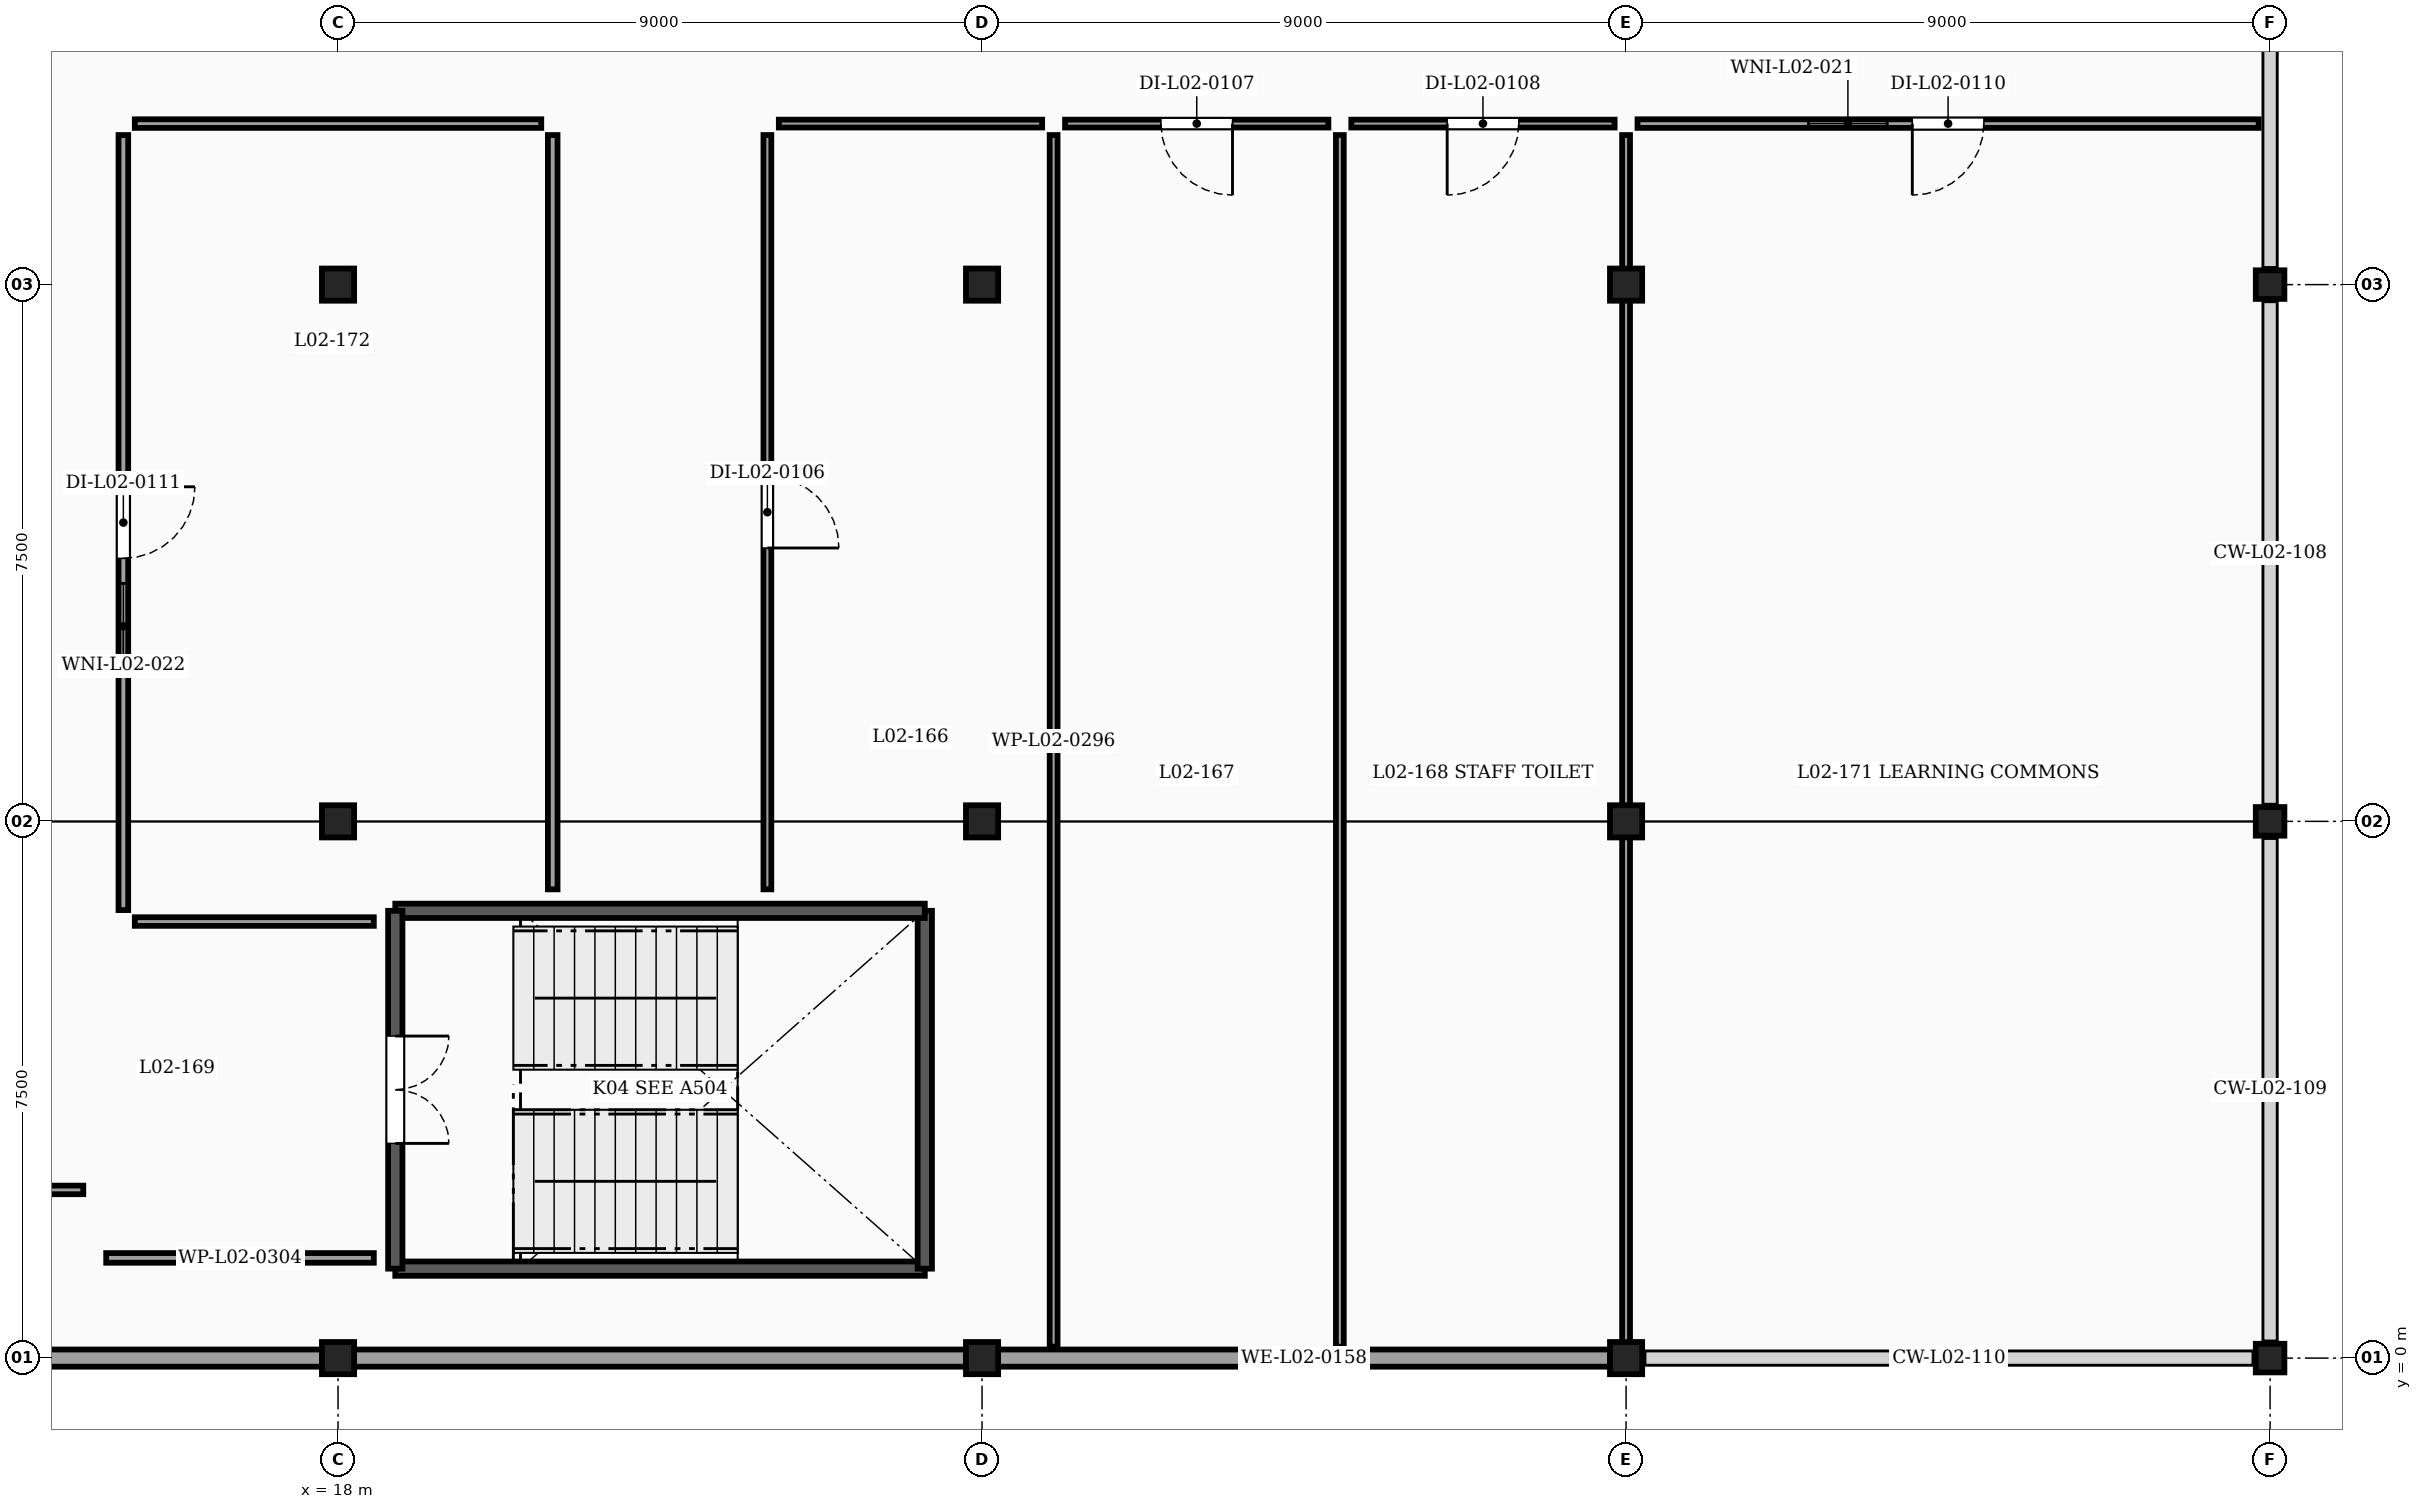
"""IFC4 building model, lengths in metres.
Left out: names, types, materials, properties, quantities, classifications, styles, units other than length and angle.
Written with IfcOpenShell. Run it as: python <this file> out.ifc"""

import sys

from ifc_helpers import new_model, si_unit, direction, frame, frame_2d, origin, origin_2d, place, context, subcontext, project, spatial, rectangle, extrude, element, fill, save


model = new_model("IFC4")
c1 = context("Model", 3, precision=1e-05, world=origin(), true_north=direction((0.0, 1.0)))
c2 = subcontext(c1, "Body", "Model", "MODEL_VIEW")
j1 = project(units=[si_unit("LENGTHUNIT", "METRE"), si_unit("PLANEANGLEUNIT", "RADIAN")], contexts=[c1])
p1 = place(None, origin())
s1 = spatial("IfcSite", under=j1, at=p1, CompositionType="ELEMENT")
p2 = place(p1, origin())
s2 = spatial("IfcBuilding", under=s1, at=p2, CompositionType="ELEMENT")
p3 = place(p2, frame((0.0, 0.0, 8.5)))
s3 = spatial("IfcBuildingStorey", under=s2, at=p3, CompositionType="ELEMENT", Elevation=8.5)
for number, where, z_axis, x_axis in (
    (1, (18.0, 0.0, 0.0), (0.0, 0.0, 1.0), (1.0, 0.0, 0.0)),
    (2, (27.0, 0.0, 0.0), (0.0, 0.0, 1.0), (1.0, 0.0, 0.0)),
    (3, (36.0, 0.0, 0.0), (0.0, 0.0, 1.0), (1.0, 0.0, 0.0)),
):
    element("IfcColumn", number, at=place(p3, frame(where, z_axis=z_axis, x_axis=x_axis)), inside=s3, PredefinedType="COLUMN", context=c2, shape_type="SweptSolid", body=[
        extrude(rectangle(XDim=0.45, YDim=0.45, at=origin_2d()), origin(), (0.0, 0.0, 1.0), 3.8),
    ])
p4 = place(p3, frame((45.0, 0.0, 0.0), z_axis=(0.0, 0.0, 1.0), x_axis=(1.0, 0.0, 0.0)))
e4 = element("IfcColumn", 4, at=p4, inside=s3, PredefinedType="COLUMN", context=c2, shape_type="SweptSolid", body=[
    extrude(rectangle(XDim=0.4, YDim=0.4, at=origin_2d()), origin(), (0.0, 0.0, 1.0), 3.8),
])
for number, where, z_axis, x_axis in (
    (5, (18.0, 7.5, 0.0), (0.0, 0.0, 1.0), (1.0, 0.0, 0.0)),
    (6, (27.0, 7.5, 0.0), (0.0, 0.0, 1.0), (1.0, 0.0, 0.0)),
    (7, (36.0, 7.5, 0.0), (0.0, 0.0, 1.0), (1.0, 0.0, 0.0)),
):
    element("IfcColumn", number, at=place(p3, frame(where, z_axis=z_axis, x_axis=x_axis)), inside=s3, PredefinedType="COLUMN", context=c2, shape_type="SweptSolid", body=[
        extrude(rectangle(XDim=0.45, YDim=0.45, at=origin_2d()), origin(), (0.0, 0.0, 1.0), 3.8),
    ])
p5 = place(p3, frame((45.0, 7.5, 0.0), z_axis=(0.0, 0.0, 1.0), x_axis=(1.0, 0.0, 0.0)))
e8 = element("IfcColumn", 8, at=p5, inside=s3, PredefinedType="COLUMN", context=c2, shape_type="SweptSolid", body=[
    extrude(rectangle(XDim=0.4, YDim=0.4, at=origin_2d()), origin(), (0.0, 0.0, 1.0), 3.8),
])
for number, where, z_axis, x_axis in (
    (9, (18.0, 15.0, 0.0), (0.0, 0.0, 1.0), (1.0, 0.0, 0.0)),
    (10, (27.0, 15.0, 0.0), (0.0, 0.0, 1.0), (1.0, 0.0, 0.0)),
    (11, (36.0, 15.0, 0.0), (0.0, 0.0, 1.0), (1.0, 0.0, 0.0)),
):
    element("IfcColumn", number, at=place(p3, frame(where, z_axis=z_axis, x_axis=x_axis)), inside=s3, PredefinedType="COLUMN", context=c2, shape_type="SweptSolid", body=[
        extrude(rectangle(XDim=0.45, YDim=0.45, at=origin_2d()), origin(), (0.0, 0.0, 1.0), 3.8),
    ])
p6 = place(p3, frame((45.0, 15.0, 0.0), z_axis=(0.0, 0.0, 1.0), x_axis=(1.0, 0.0, 0.0)))
e12 = element("IfcColumn", 12, at=p6, inside=s3, PredefinedType="COLUMN", context=c2, shape_type="SweptSolid", body=[
    extrude(rectangle(XDim=0.4, YDim=0.4, at=origin_2d()), origin(), (0.0, 0.0, 1.0), 3.8),
])
for number, where, z_axis, x_axis in (
    (13, (35.779, 0.0, 0.0), (0.0, 0.0, 1.0), (-1.0, 0.0, 0.0)),
    (14, (26.779, 0.0, 0.0), (0.0, 0.0, 1.0), (-1.0, 0.0, 0.0)),
    (15, (17.779, 0.0, 0.0), (0.0, 0.0, 1.0), (-1.0, 0.0, 0.0)),
):
    element("IfcWall", number, at=place(p3, frame(where, z_axis=z_axis, x_axis=x_axis)), inside=s3, PredefinedType="SOLIDWALL", context=c2, shape_type="SweptSolid", body=[
        extrude(rectangle(XDim=8.558, YDim=0.24, at=frame_2d((4.279, 0.0))), origin(), (0.0, 0.0, 1.0), 3.23),
    ])
p7 = place(p3, frame((18.8, 1.25, 0.0), z_axis=(0.0, 0.0, 1.0), x_axis=(1.0, 0.0, 0.0)))
e16 = element("IfcWall", 16, at=p7, inside=s3, PredefinedType="SHEAR", context=c2, shape_type="SweptSolid", body=[
    extrude(rectangle(XDim=7.4, YDim=0.2, at=frame_2d((3.7, 0.0))), origin(), (0.0, 0.0, 1.0), 3.59),
])
p8 = place(p3, frame((26.2, 1.25, 0.0), z_axis=(0.0, 0.0, 1.0), x_axis=(0.0, 1.0, 0.0)))
e17 = element("IfcWall", 17, at=p8, inside=s3, PredefinedType="SHEAR", context=c2, shape_type="SweptSolid", body=[
    extrude(rectangle(XDim=5.0, YDim=0.2, at=frame_2d((2.5, 0.0))), origin(), (0.0, 0.0, 1.0), 3.59),
])
p9 = place(p3, frame((26.2, 6.25, 0.0), z_axis=(0.0, 0.0, 1.0), x_axis=(-1.0, 0.0, 0.0)))
e18 = element("IfcWall", 18, at=p9, inside=s3, PredefinedType="SHEAR", context=c2, shape_type="SweptSolid", body=[
    extrude(rectangle(XDim=7.4, YDim=0.2, at=frame_2d((3.7, 0.0))), origin(), (0.0, 0.0, 1.0), 3.59),
])
p10 = place(p3, frame((18.8, 6.25, 0.0), z_axis=(0.0, 0.0, 1.0), x_axis=(0.0, -1.0, 0.0)))
e19 = element("IfcWall", 19, at=p10, inside=s3, PredefinedType="SHEAR", context=c2, shape_type="SweptSolid", body=[
    extrude(rectangle(XDim=5.0, YDim=0.2, at=frame_2d((2.5, 0.0))), origin(), (0.0, 0.0, 1.0), 3.59),
])
p11 = place(p10, frame((1.75, 0.0, 0.0)))
e20 = element("IfcOpeningElement", 20, at=p11, cuts=e19, PredefinedType="OPENING", context=c2, shape_type="SweptSolid", body=[
    extrude(rectangle(XDim=1.5, YDim=2.15, at=frame_2d((0.75, 1.075))), frame((0.0, 0.11, 0.0), z_axis=(0.0, -1.0, 0.0), x_axis=(1.0, 0.0, 0.0)), (0.0, 0.0, 1.0), 0.22),
])
p12 = place(p3, frame((28.0, 0.16, 0.0), z_axis=(0.0, 0.0, 1.0), x_axis=(0.0, 1.0, 0.0)))
e21 = element("IfcWall", 21, at=p12, inside=s3, PredefinedType="PARTITIONING", context=c2, shape_type="SweptSolid", body=[
    extrude(rectangle(XDim=16.93, YDim=0.11, at=frame_2d((8.465, 0.0))), origin(), (0.0, 0.0, 1.0), 3.59),
])
p13 = place(p3, frame((24.0, 17.09, 0.0), z_axis=(0.0, 0.0, 1.0), x_axis=(0.0, -1.0, 0.0)))
e22 = element("IfcWall", 22, at=p13, inside=s3, PredefinedType="PARTITIONING", context=c2, shape_type="SweptSolid", body=[
    extrude(rectangle(XDim=10.54, YDim=0.11, at=frame_2d((5.27, 0.0))), origin(), (0.0, 0.0, 1.0), 3.182),
])
p14 = place(p13, frame((4.77, 0.0, 0.0)))
e23 = element("IfcOpeningElement", 23, at=p14, cuts=e22, PredefinedType="OPENING", context=c2, shape_type="SweptSolid", body=[
    extrude(rectangle(XDim=1.0, YDim=2.15, at=frame_2d((0.5, 1.075))), frame((0.0, 0.065, 0.0), z_axis=(0.0, -1.0, 0.0), x_axis=(1.0, 0.0, 0.0)), (0.0, 0.0, 1.0), 0.13),
])
p15 = place(p3, frame((27.84, 17.25, 0.0), z_axis=(0.0, 0.0, 1.0), x_axis=(-1.0, 0.0, 0.0)))
e24 = element("IfcWall", 24, at=p15, inside=s3, PredefinedType="PARTITIONING", context=c2, shape_type="SweptSolid", body=[
    extrude(rectangle(XDim=3.68, YDim=0.11, at=frame_2d((1.84, 0.0))), origin(), (0.0, 0.0, 1.0), 3.59),
])
p16 = place(p3, frame((32.0, 0.16, 0.0), z_axis=(0.0, 0.0, 1.0), x_axis=(0.0, 1.0, 0.0)))
e25 = element("IfcWall", 25, at=p16, inside=s3, PredefinedType="PARTITIONING", context=c2, shape_type="SweptSolid", body=[
    extrude(rectangle(XDim=16.93, YDim=0.11, at=frame_2d((8.465, 0.0))), origin(), (0.0, 0.0, 1.0), 3.59),
])
p17 = place(p3, frame((31.84, 17.25, 0.0), z_axis=(0.0, 0.0, 1.0), x_axis=(-1.0, 0.0, 0.0)))
e26 = element("IfcWall", 26, at=p17, inside=s3, PredefinedType="PARTITIONING", context=c2, shape_type="SweptSolid", body=[
    extrude(rectangle(XDim=3.68, YDim=0.11, at=frame_2d((1.84, 0.0))), origin(), (0.0, 0.0, 1.0), 3.59),
])
p18 = place(p17, frame((1.34, 0.0, 0.0)))
e27 = element("IfcOpeningElement", 27, at=p18, cuts=e26, PredefinedType="OPENING", context=c2, shape_type="SweptSolid", body=[
    extrude(rectangle(XDim=1.0, YDim=2.15, at=frame_2d((0.5, 1.075))), frame((0.0, 0.065, 0.0), z_axis=(0.0, -1.0, 0.0), x_axis=(1.0, 0.0, 0.0)), (0.0, 0.0, 1.0), 0.13),
])
p19 = place(p3, frame((35.84, 17.25, 0.0), z_axis=(0.0, 0.0, 1.0), x_axis=(-1.0, 0.0, 0.0)))
e28 = element("IfcWall", 28, at=p19, inside=s3, PredefinedType="PARTITIONING", context=c2, shape_type="SweptSolid", body=[
    extrude(rectangle(XDim=3.68, YDim=0.11, at=frame_2d((1.84, 0.0))), origin(), (0.0, 0.0, 1.0), 3.59),
])
p20 = place(p19, frame((1.34, 0.0, 0.0)))
e29 = element("IfcOpeningElement", 29, at=p20, cuts=e28, PredefinedType="OPENING", context=c2, shape_type="SweptSolid", body=[
    extrude(rectangle(XDim=1.0, YDim=2.15, at=frame_2d((0.5, 1.075))), frame((0.0, 0.065, 0.0), z_axis=(0.0, -1.0, 0.0), x_axis=(1.0, 0.0, 0.0)), (0.0, 0.0, 1.0), 0.13),
])
p21 = place(p3, frame((36.0, 0.16, 0.0), z_axis=(0.0, 0.0, 1.0), x_axis=(0.0, 1.0, 0.0)))
e30 = element("IfcWall", 30, at=p21, inside=s3, PredefinedType="PARTITIONING", context=c2, shape_type="SweptSolid", body=[
    extrude(rectangle(XDim=16.93, YDim=0.11, at=frame_2d((8.465, 0.0))), origin(), (0.0, 0.0, 1.0), 3.049),
])
p22 = place(p3, frame((18.5, 1.4, 0.0), z_axis=(0.0, 0.0, 1.0), x_axis=(-1.0, 0.0, 0.0)))
e31 = element("IfcWall", 31, at=p22, inside=s3, PredefinedType="PARTITIONING", context=c2, shape_type="SweptSolid", body=[
    extrude(rectangle(XDim=3.74, YDim=0.135, at=frame_2d((1.87, 0.0))), origin(), (0.0, 0.0, 1.0), 3.59),
])
p23 = place(p3, frame((14.44, 2.35, 0.0), z_axis=(0.0, 0.0, 1.0), x_axis=(-1.0, 0.0, 0.0)))
e32 = element("IfcWall", 32, at=p23, inside=s3, PredefinedType="PARTITIONING", context=c2, shape_type="SweptSolid", body=[
    extrude(rectangle(XDim=2.18, YDim=0.12, at=frame_2d((1.09, 0.0))), origin(), (0.0, 0.0, 1.0), 3.59),
])
p24 = place(p3, frame((44.84, 17.25, 0.0), z_axis=(0.0, 0.0, 1.0), x_axis=(-1.0, 0.0, 0.0)))
e33 = element("IfcWall", 33, at=p24, inside=s3, PredefinedType="PARTITIONING", context=c2, shape_type="SweptSolid", body=[
    extrude(rectangle(XDim=8.68, YDim=0.12, at=frame_2d((4.34, 0.0))), origin(), (0.0, 0.0, 1.0), 3.59),
])
p25 = place(p24, frame((3.84, 0.0, 0.0)))
e34 = element("IfcOpeningElement", 34, at=p25, cuts=e33, PredefinedType="OPENING", context=c2, shape_type="SweptSolid", body=[
    extrude(rectangle(XDim=1.0, YDim=2.15, at=frame_2d((0.5, 1.075))), frame((0.0, 0.07, 0.0), z_axis=(0.0, -1.0, 0.0), x_axis=(1.0, 0.0, 0.0)), (0.0, 0.0, 1.0), 0.14),
])
p26 = place(p24, frame((5.19, 0.0, 1.02)))
e35 = element("IfcOpeningElement", 35, at=p26, cuts=e33, PredefinedType="OPENING", context=c2, shape_type="SweptSolid", body=[
    extrude(rectangle(XDim=1.1, YDim=1.12, at=frame_2d((0.55, 0.56))), frame((0.0, 0.07, 0.0), z_axis=(0.0, -1.0, 0.0), x_axis=(1.0, 0.0, 0.0)), (0.0, 0.0, 1.0), 0.14),
])
p27 = place(p3, frame((21.0, 6.55, 0.0), z_axis=(0.0, 0.0, 1.0), x_axis=(0.0, 1.0, 0.0)))
e36 = element("IfcWall", 36, at=p27, inside=s3, PredefinedType="PARTITIONING", context=c2, shape_type="SweptSolid", body=[
    extrude(rectangle(XDim=10.54, YDim=0.135, at=frame_2d((5.27, 0.0))), origin(), (0.0, 0.0, 1.0), 3.182),
])
p28 = place(p3, frame((20.84, 17.25, 0.0), z_axis=(0.0, 0.0, 1.0), x_axis=(-1.0, 0.0, 0.0)))
e37 = element("IfcWall", 37, at=p28, inside=s3, PredefinedType="PARTITIONING", context=c2, shape_type="SweptSolid", body=[
    extrude(rectangle(XDim=5.68, YDim=0.12, at=frame_2d((2.84, 0.0))), origin(), (0.0, 0.0, 1.0), 3.59),
])
p29 = place(p3, frame((15.0, 17.09, 0.0), z_axis=(0.0, 0.0, 1.0), x_axis=(0.0, -1.0, 0.0)))
e38 = element("IfcWall", 38, at=p29, inside=s3, PredefinedType="PARTITIONING", context=c2, shape_type="SweptSolid", body=[
    extrude(rectangle(XDim=10.83, YDim=0.135, at=frame_2d((5.415, 0.0))), origin(), (0.0, 0.0, 1.0), 3.182),
])
p30 = place(p29, frame((4.915, 0.0, 0.0)))
e39 = element("IfcOpeningElement", 39, at=p30, cuts=e38, PredefinedType="OPENING", context=c2, shape_type="SweptSolid", body=[
    extrude(rectangle(XDim=1.0, YDim=2.15, at=frame_2d((0.5, 1.075))), frame((0.0, 0.077, 0.0), z_axis=(0.0, -1.0, 0.0), x_axis=(1.0, 0.0, 0.0)), (0.0, 0.0, 1.0), 0.155),
])
p31 = place(p29, frame((6.265, 0.0, 1.02)))
e40 = element("IfcOpeningElement", 40, at=p31, cuts=e38, PredefinedType="OPENING", context=c2, shape_type="SweptSolid", body=[
    extrude(rectangle(XDim=1.2, YDim=1.15, at=frame_2d((0.6, 0.575))), frame((0.0, 0.077, 0.0), z_axis=(0.0, -1.0, 0.0), x_axis=(1.0, 0.0, 0.0)), (0.0, 0.0, 1.0), 0.155),
])
p32 = place(p3, frame((15.16, 6.1, 0.0), z_axis=(0.0, 0.0, 1.0), x_axis=(1.0, 0.0, 0.0)))
e41 = element("IfcWall", 41, at=p32, inside=s3, PredefinedType="PARTITIONING", context=c2, shape_type="SweptSolid", body=[
    extrude(rectangle(XDim=3.34, YDim=0.12, at=frame_2d((1.67, 0.0))), origin(), (0.0, 0.0, 1.0), 3.59),
])
p33 = place(p11, origin())
e42 = element("IfcDoor", 42, at=p33, inside=s3, OperationType="DOUBLE_DOOR_SINGLE_SWING", PredefinedType="DOOR", context=c2, shape_type="SweptSolid", body=[
    extrude(rectangle(XDim=1.5, YDim=2.15, at=frame_2d((0.75, 1.075))), frame((0.0, 0.025, 0.0), z_axis=(0.0, -1.0, 0.0), x_axis=(1.0, 0.0, 0.0)), (0.0, 0.0, 1.0), 0.05),
])
fill(e20, e42)
p34 = place(p14, origin())
e43 = element("IfcDoor", 43, at=p34, inside=s3, OperationType="SINGLE_SWING_RIGHT", PredefinedType="DOOR", context=c2, shape_type="SweptSolid", body=[
    extrude(rectangle(XDim=1.0, YDim=2.15, at=frame_2d((0.5, 1.075))), frame((0.0, 0.025, 0.0), z_axis=(0.0, -1.0, 0.0), x_axis=(1.0, 0.0, 0.0)), (0.0, 0.0, 1.0), 0.05),
])
fill(e23, e43)
p35 = place(p18, origin())
e44 = element("IfcDoor", 44, at=p35, inside=s3, OperationType="SINGLE_SWING_LEFT", PredefinedType="DOOR", context=c2, shape_type="SweptSolid", body=[
    extrude(rectangle(XDim=1.0, YDim=2.15, at=frame_2d((0.5, 1.075))), frame((0.0, 0.025, 0.0), z_axis=(0.0, -1.0, 0.0), x_axis=(1.0, 0.0, 0.0)), (0.0, 0.0, 1.0), 0.05),
])
fill(e27, e44)
p36 = place(p20, origin())
e45 = element("IfcDoor", 45, at=p36, inside=s3, OperationType="SINGLE_SWING_RIGHT", PredefinedType="DOOR", context=c2, shape_type="SweptSolid", body=[
    extrude(rectangle(XDim=1.0, YDim=2.15, at=frame_2d((0.5, 1.075))), frame((0.0, 0.025, 0.0), z_axis=(0.0, -1.0, 0.0), x_axis=(1.0, 0.0, 0.0)), (0.0, 0.0, 1.0), 0.05),
])
fill(e29, e45)
p37 = place(p25, origin())
e46 = element("IfcDoor", 46, at=p37, inside=s3, OperationType="SINGLE_SWING_RIGHT", PredefinedType="DOOR", context=c2, shape_type="SweptSolid", body=[
    extrude(rectangle(XDim=1.0, YDim=2.15, at=frame_2d((0.5, 1.075))), frame((0.0, 0.025, 0.0), z_axis=(0.0, -1.0, 0.0), x_axis=(1.0, 0.0, 0.0)), (0.0, 0.0, 1.0), 0.05),
])
fill(e34, e46)
p38 = place(p26, origin())
e47 = element("IfcWindow", 47, at=p38, inside=s3, PartitioningType="DOUBLE_PANEL_VERTICAL", PredefinedType="WINDOW", context=c2, shape_type="SweptSolid", body=[
    extrude(rectangle(XDim=1.1, YDim=1.12, at=frame_2d((0.55, 0.56))), frame((0.0, 0.03, 0.0), z_axis=(0.0, -1.0, 0.0), x_axis=(1.0, 0.0, 0.0)), (0.0, 0.0, 1.0), 0.06),
])
fill(e35, e47)
p39 = place(p30, origin())
e48 = element("IfcDoor", 48, at=p39, inside=s3, OperationType="SINGLE_SWING_LEFT", PredefinedType="DOOR", context=c2, shape_type="SweptSolid", body=[
    extrude(rectangle(XDim=1.0, YDim=2.15, at=frame_2d((0.5, 1.075))), frame((0.0, 0.025, 0.0), z_axis=(0.0, -1.0, 0.0), x_axis=(1.0, 0.0, 0.0)), (0.0, 0.0, 1.0), 0.05),
])
fill(e39, e48)
p40 = place(p31, origin())
e49 = element("IfcWindow", 49, at=p40, inside=s3, PartitioningType="DOUBLE_PANEL_VERTICAL", PredefinedType="WINDOW", context=c2, shape_type="SweptSolid", body=[
    extrude(rectangle(XDim=1.2, YDim=1.15, at=frame_2d((0.6, 0.575))), frame((0.0, 0.03, 0.0), z_axis=(0.0, -1.0, 0.0), x_axis=(1.0, 0.0, 0.0)), (0.0, 0.0, 1.0), 0.06),
])
fill(e40, e49)
save(model, sys.argv[1])
